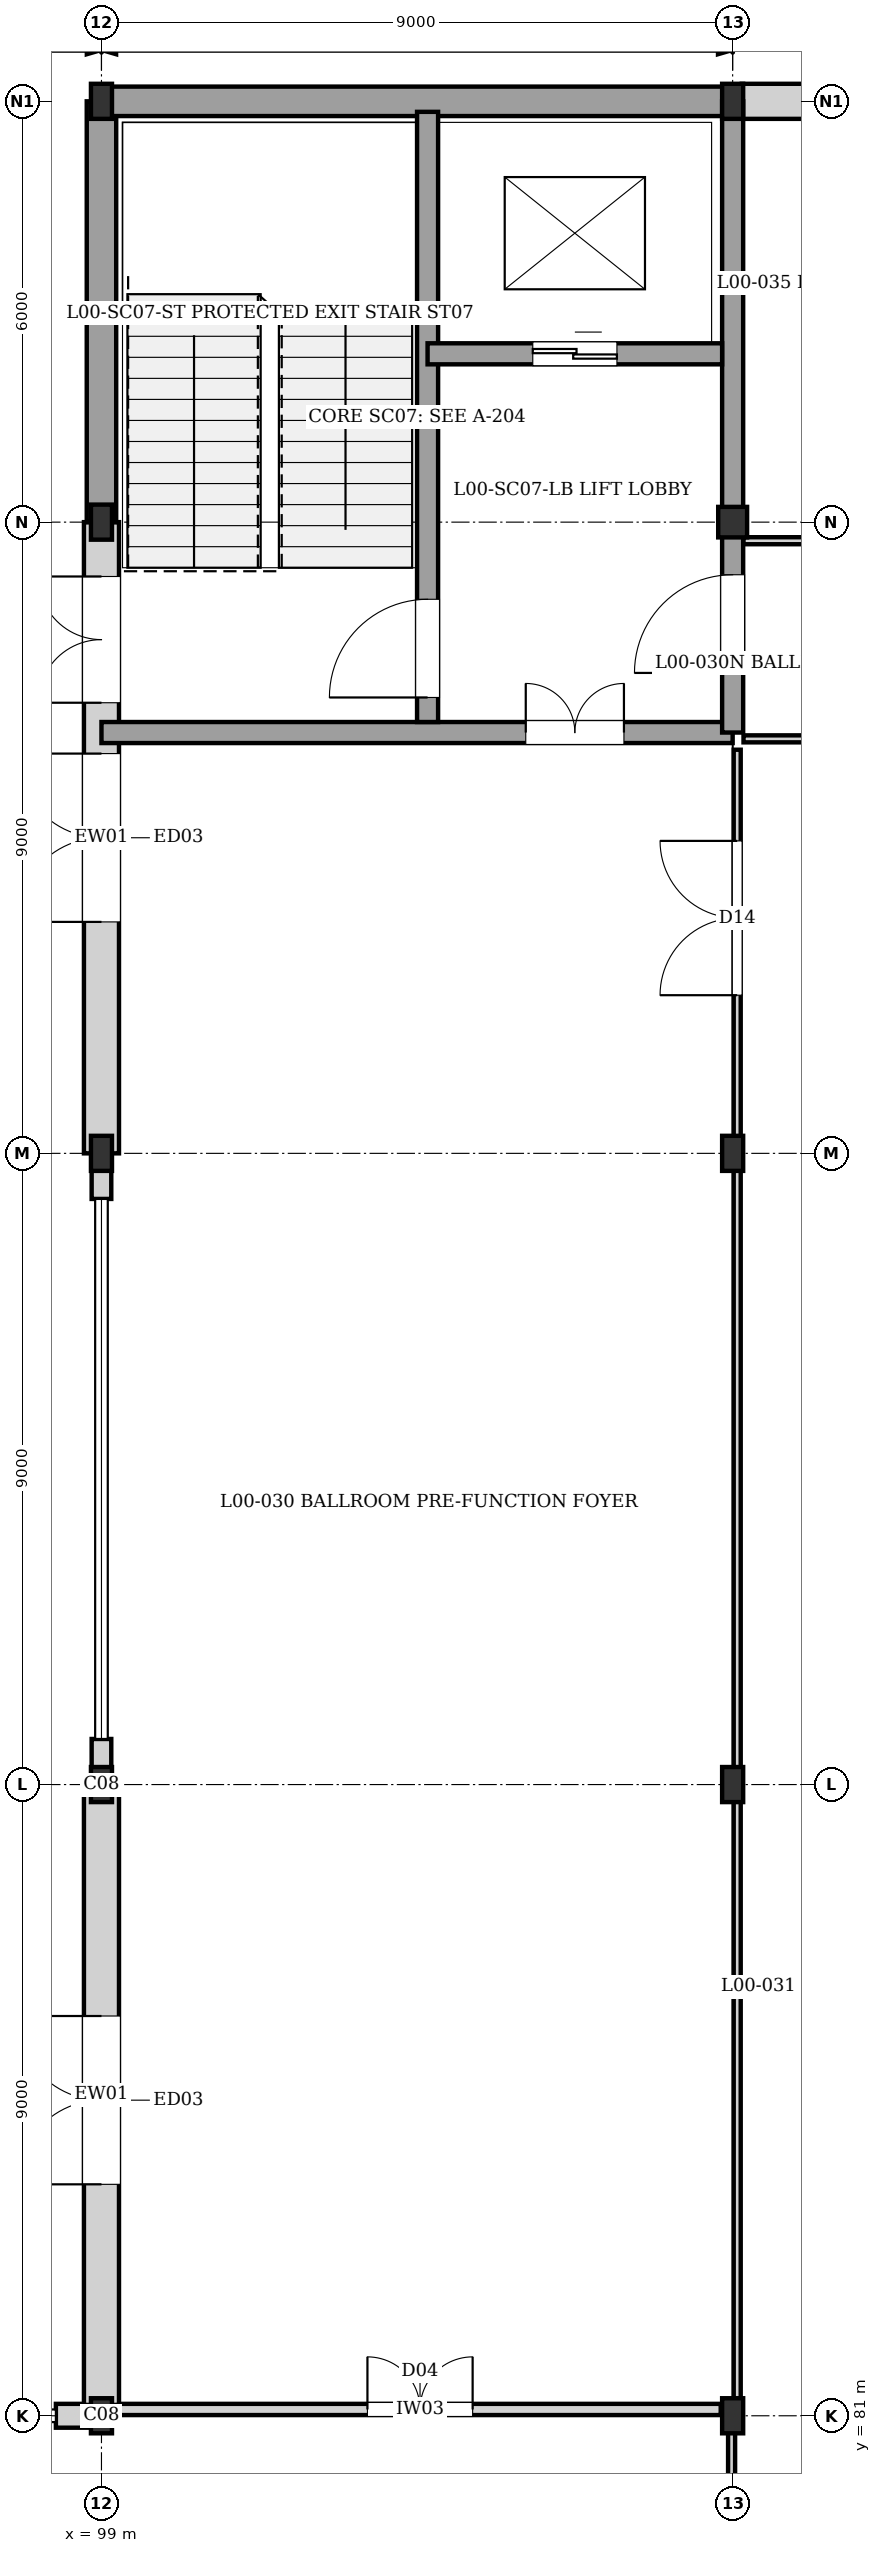
"""IFC4 building model, lengths in metres.
Left out: names, types, materials, properties, quantities, classifications, styles, units other than length and angle.
Written with IfcOpenShell. Run it as: python <this file> out.ifc"""

import sys

from ifc_helpers import new_model, si_unit, direction, frame, frame_2d, origin, origin_2d, place, context, subcontext, project, spatial, rectangle, i_section, extrude, element, fill, save


model = new_model("IFC4")
c1 = context("Model", 3, precision=1e-05, world=origin(), true_north=direction((0.0, 1.0)))
c2 = subcontext(c1, "Body", "Model", "MODEL_VIEW")
j1 = project(units=[si_unit("LENGTHUNIT", "METRE"), si_unit("PLANEANGLEUNIT", "RADIAN")], contexts=[c1])
p1 = place(None, origin())
s1 = spatial("IfcSite", under=j1, at=p1, CompositionType="ELEMENT")
p2 = place(p1, origin())
s2 = spatial("IfcBuilding", under=s1, at=p2, CompositionType="ELEMENT")
p3 = place(p2, origin())
s3 = spatial("IfcBuildingStorey", under=s2, at=p3, CompositionType="ELEMENT", Elevation=0.0)
for number, where, z_axis, x_axis in (
    (1, (99.0, 81.0, 0.0), (0.0, 0.0, 1.0), (1.0, 0.0, 0.0)),
    (2, (99.0, 90.0, 0.0), (0.0, 0.0, 1.0), (1.0, 0.0, 0.0)),
    (3, (99.0, 99.0, 0.0), (0.0, 0.0, 1.0), (1.0, 0.0, 0.0)),
    (4, (99.0, 108.0, 0.0), (0.0, 0.0, 1.0), (1.0, 0.0, 0.0)),
    (5, (99.0, 114.0, 0.0), (0.0, 0.0, 1.0), (1.0, 0.0, 0.0)),
    (6, (108.0, 81.0, 0.0), (0.0, 0.0, 1.0), (1.0, 0.0, 0.0)),
    (7, (108.0, 90.0, 0.0), (0.0, 0.0, 1.0), (1.0, 0.0, 0.0)),
    (8, (108.0, 99.0, 0.0), (0.0, 0.0, 1.0), (1.0, 0.0, 0.0)),
):
    element("IfcColumn", number, at=place(p3, frame(where, z_axis=z_axis, x_axis=x_axis)), inside=s3, PredefinedType="COLUMN", context=c2, shape_type="SweptSolid", body=[
        extrude(i_section(OverallWidth=0.3, OverallDepth=0.5, WebThickness=0.014, FlangeThickness=0.028, at=origin_2d()), origin(), (0.0, 0.0, 1.0), 4.32),
    ])
p4 = place(p3, frame((108.0, 108.0, 0.0), z_axis=(0.0, 0.0, 1.0), x_axis=(1.0, 0.0, 0.0)))
e9 = element("IfcColumn", 9, at=p4, inside=s3, PredefinedType="COLUMN", context=c2, shape_type="SweptSolid", body=[
    extrude(i_section(OverallWidth=0.412, OverallDepth=0.435, WebThickness=0.027, FlangeThickness=0.046, at=origin_2d()), origin(), (0.0, 0.0, 1.0), 4.32),
])
p5 = place(p3, frame((108.0, 114.0, 0.0), z_axis=(0.0, 0.0, 1.0), x_axis=(1.0, 0.0, 0.0)))
e10 = element("IfcColumn", 10, at=p5, inside=s3, PredefinedType="COLUMN", context=c2, shape_type="SweptSolid", body=[
    extrude(i_section(OverallWidth=0.3, OverallDepth=0.5, WebThickness=0.014, FlangeThickness=0.028, at=origin_2d()), origin(), (0.0, 0.0, 1.0), 4.32),
])
p6 = place(p3, frame((98.35, 81.0, 0.0), z_axis=(0.0, 0.0, 1.0), x_axis=(1.0, 0.0, 0.0)))
e11 = element("IfcWall", 11, at=p6, inside=s3, PredefinedType="SOLIDWALL", context=c2, shape_type="SweptSolid", body=[
    extrude(rectangle(XDim=0.65, YDim=0.34, at=frame_2d((0.325, 0.0))), origin(), (0.0, 0.0, 1.0), 3.825),
])
p7 = place(p3, frame((99.0, 81.155, 0.0), z_axis=(0.0, 0.0, 1.0), x_axis=(0.0, 1.0, 0.0)))
e12 = element("IfcWall", 12, at=p7, inside=s3, PredefinedType="SOLIDWALL", context=c2, shape_type="SweptSolid", body=[
    extrude(rectangle(XDim=8.845, YDim=0.5, at=frame_2d((4.422, 0.0))), origin(), (0.0, 0.0, 1.0), 4.055),
])
p8 = place(p7, frame((3.145, 0.0, 0.0)))
e13 = element("IfcOpeningElement", 13, at=p8, cuts=e12, PredefinedType="OPENING", context=c2, shape_type="SweptSolid", body=[
    extrude(rectangle(XDim=2.4, YDim=2.5, at=frame_2d((1.2, 1.25))), frame((0.0, 0.26, 0.0), z_axis=(0.0, -1.0, 0.0), x_axis=(1.0, 0.0, 0.0)), (0.0, 0.0, 1.0), 0.52),
])
for number, where, z_axis, x_axis in (
    (14, (99.0, 90.0, 0.0), (0.0, 0.0, 1.0), (0.0, 1.0, 0.0)),
    (15, (99.0, 98.35, 0.0), (0.0, 0.0, 1.0), (0.0, 1.0, 0.0)),
):
    element("IfcWall", number, at=place(p3, frame(where, z_axis=z_axis, x_axis=x_axis)), inside=s3, PredefinedType="SOLIDWALL", context=c2, shape_type="SweptSolid", body=[
        extrude(rectangle(XDim=0.65, YDim=0.28, at=frame_2d((0.325, 0.0))), origin(), (0.0, 0.0, 1.0), 3.755),
    ])
p9 = place(p3, frame((99.0, 99.0, 0.0), z_axis=(0.0, 0.0, 1.0), x_axis=(0.0, 1.0, 0.0)))
e16 = element("IfcWall", 16, at=p9, inside=s3, PredefinedType="SOLIDWALL", context=c2, shape_type="SweptSolid", body=[
    extrude(rectangle(XDim=9.0, YDim=0.5, at=frame_2d((4.5, 0.0))), origin(), (0.0, 0.0, 1.0), 3.695),
])
p10 = place(p9, frame((6.425, 0.0, 0.0)))
e17 = element("IfcOpeningElement", 17, at=p10, cuts=e16, PredefinedType="OPENING", context=c2, shape_type="SweptSolid", body=[
    extrude(rectangle(XDim=1.8, YDim=2.2, at=frame_2d((0.9, 1.1))), frame((0.0, 0.26, 0.0), z_axis=(0.0, -1.0, 0.0), x_axis=(1.0, 0.0, 0.0)), (0.0, 0.0, 1.0), 0.52),
])
p11 = place(p9, frame((3.3, 0.0, 0.0)))
e18 = element("IfcOpeningElement", 18, at=p11, cuts=e16, PredefinedType="OPENING", context=c2, shape_type="SweptSolid", body=[
    extrude(rectangle(XDim=2.4, YDim=2.5, at=frame_2d((1.2, 1.25))), frame((0.0, 0.26, 0.0), z_axis=(0.0, -1.0, 0.0), x_axis=(1.0, 0.0, 0.0)), (0.0, 0.0, 1.0), 0.52),
])
p12 = place(p3, frame((99.0, 108.0, 0.0), z_axis=(0.0, 0.0, 1.0), x_axis=(0.0, 1.0, 0.0)))
e19 = element("IfcWall", 19, at=p12, inside=s3, PredefinedType="SOLIDWALL", context=c2, shape_type="SweptSolid", body=[
    extrude(rectangle(XDim=6.0, YDim=0.42, at=frame_2d((3.0, 0.0))), origin(), (0.0, 0.0, 1.0), 4.055),
])
p13 = place(p3, frame((99.0, 114.0, 0.0), z_axis=(0.0, 0.0, 1.0), x_axis=(1.0, 0.0, 0.0)))
e20 = element("IfcWall", 20, at=p13, inside=s3, PredefinedType="SOLIDWALL", context=c2, shape_type="SweptSolid", body=[
    extrude(rectangle(XDim=9.0, YDim=0.42, at=frame_2d((4.5, 0.0))), origin(), (0.0, 0.0, 1.0), 4.055),
])
p14 = place(p3, frame((108.13, 114.0, 0.0), z_axis=(0.0, 0.0, 1.0), x_axis=(1.0, 0.0, 0.0)))
e21 = element("IfcWall", 21, at=p14, inside=s3, PredefinedType="SOLIDWALL", context=c2, shape_type="SweptSolid", body=[
    extrude(rectangle(XDim=8.87, YDim=0.5, at=frame_2d((4.435, 0.0))), origin(), (0.0, 0.0, 1.0), 3.695),
])
p15 = place(p3, frame((99.0, 105.0, 0.0), z_axis=(0.0, 0.0, 1.0), x_axis=(1.0, 0.0, 0.0)))
e22 = element("IfcWall", 22, at=p15, inside=s3, PredefinedType="SHEAR", context=c2, shape_type="SweptSolid", body=[
    extrude(rectangle(XDim=9.0, YDim=0.3, at=frame_2d((4.5, 0.0))), origin(), (0.0, 0.0, 1.0), 4.055),
])
p16 = place(p15, frame((6.05, 0.0, 0.0)))
e23 = element("IfcOpeningElement", 23, at=p16, cuts=e22, PredefinedType="OPENING", context=c2, shape_type="SweptSolid", body=[
    extrude(rectangle(XDim=1.4, YDim=2.02, at=frame_2d((0.7, 1.01))), frame((0.0, 0.16, 0.0), z_axis=(0.0, -1.0, 0.0), x_axis=(1.0, 0.0, 0.0)), (0.0, 0.0, 1.0), 0.32),
])
p17 = place(p3, frame((108.0, 105.0, 0.0), z_axis=(0.0, 0.0, 1.0), x_axis=(0.0, 1.0, 0.0)))
e24 = element("IfcWall", 24, at=p17, inside=s3, PredefinedType="SHEAR", context=c2, shape_type="SweptSolid", body=[
    extrude(rectangle(XDim=9.0, YDim=0.3, at=frame_2d((4.5, 0.0))), origin(), (0.0, 0.0, 1.0), 4.055),
])
p18 = place(p17, frame((0.85, 0.0, 0.0)))
e25 = element("IfcOpeningElement", 25, at=p18, cuts=e24, PredefinedType="OPENING", context=c2, shape_type="SweptSolid", body=[
    extrude(rectangle(XDim=1.4, YDim=2.02, at=frame_2d((0.7, 1.01))), frame((0.0, 0.16, 0.0), z_axis=(0.0, -1.0, 0.0), x_axis=(1.0, 0.0, 0.0)), (0.0, 0.0, 1.0), 0.32),
])
p19 = place(p3, frame((103.65, 105.15, 0.0), z_axis=(0.0, 0.0, 1.0), x_axis=(0.0, 1.0, 0.0)))
e26 = element("IfcWall", 26, at=p19, inside=s3, PredefinedType="SHEAR", context=c2, shape_type="SweptSolid", body=[
    extrude(rectangle(XDim=8.7, YDim=0.3, at=frame_2d((4.35, 0.0))), origin(), (0.0, 0.0, 1.0), 4.055),
])
p20 = place(p19, frame((0.35, 0.0, 0.0)))
e27 = element("IfcOpeningElement", 27, at=p20, cuts=e26, PredefinedType="OPENING", context=c2, shape_type="SweptSolid", body=[
    extrude(rectangle(XDim=1.4, YDim=2.02, at=frame_2d((0.7, 1.01))), frame((0.0, 0.16, 0.0), z_axis=(0.0, -1.0, 0.0), x_axis=(1.0, 0.0, 0.0)), (0.0, 0.0, 1.0), 0.32),
])
p21 = place(p3, frame((103.65, 110.4, 0.0), z_axis=(0.0, 0.0, 1.0), x_axis=(1.0, 0.0, 0.0)))
e28 = element("IfcWall", 28, at=p21, inside=s3, PredefinedType="SHEAR", context=c2, shape_type="SweptSolid", body=[
    extrude(rectangle(XDim=4.2, YDim=0.3, at=frame_2d((2.1, 0.0))), origin(), (0.0, 0.0, 1.0), 4.055),
])
p22 = place(p21, frame((1.5, 0.0, 0.0)))
e29 = element("IfcOpeningElement", 29, at=p22, cuts=e28, PredefinedType="OPENING", context=c2, shape_type="SweptSolid", body=[
    extrude(rectangle(XDim=1.2, YDim=2.2, at=frame_2d((0.6, 1.1))), frame((0.0, 0.16, 0.0), z_axis=(0.0, -1.0, 0.0), x_axis=(1.0, 0.0, 0.0)), (0.0, 0.0, 1.0), 0.32),
])
p23 = place(p3, frame((107.985, 72.145, 0.0), z_axis=(0.0, 0.0, 1.0), x_axis=(0.0, 1.0, 0.0)))
e30 = element("IfcWall", 30, at=p23, inside=s3, PredefinedType="PARTITIONING", context=c2, shape_type="SweptSolid", body=[
    extrude(rectangle(XDim=8.935, YDim=0.1, at=frame_2d((4.468, 0.0))), origin(), (0.0, 0.0, 1.0), 3.655),
])
p24 = place(p3, frame((108.155, 104.91, 0.0), z_axis=(0.0, 0.0, 1.0), x_axis=(1.0, 0.0, 0.0)))
e31 = element("IfcWall", 31, at=p24, inside=s3, PredefinedType="PARTITIONING", context=c2, shape_type="SweptSolid", body=[
    extrude(rectangle(XDim=14.745, YDim=0.1, at=frame_2d((7.373, 0.0))), origin(), (0.0, 0.0, 1.0), 4.055),
])
p25 = place(p3, frame((99.255, 81.09, 0.0), z_axis=(0.0, 0.0, 1.0), x_axis=(1.0, 0.0, 0.0)))
e32 = element("IfcWall", 32, at=p25, inside=s3, PredefinedType="PARTITIONING", context=c2, shape_type="SweptSolid", body=[
    extrude(rectangle(XDim=8.575, YDim=0.16, at=frame_2d((4.288, 0.0))), origin(), (0.0, 0.0, 1.0), 3.755),
])
p26 = place(p25, frame((3.538, 0.0, 0.0)))
e33 = element("IfcOpeningElement", 33, at=p26, cuts=e32, PredefinedType="OPENING", context=c2, shape_type="SweptSolid", body=[
    extrude(rectangle(XDim=1.5, YDim=2.1, at=frame_2d((0.75, 1.05))), frame((0.0, 0.09, 0.0), z_axis=(0.0, -1.0, 0.0), x_axis=(1.0, 0.0, 0.0)), (0.0, 0.0, 1.0), 0.18),
])
p27 = place(p3, frame((108.065, 81.245, 0.0), z_axis=(0.0, 0.0, 1.0), x_axis=(0.0, 1.0, 0.0)))
e34 = element("IfcWall", 34, at=p27, inside=s3, PredefinedType="PARTITIONING", context=c2, shape_type="SweptSolid", body=[
    extrude(rectangle(XDim=8.775, YDim=0.1, at=frame_2d((4.387, 0.0))), origin(), (0.0, 0.0, 1.0), 4.055),
])
p28 = place(p3, frame((108.155, 107.735, 0.0), z_axis=(0.0, 0.0, 1.0), x_axis=(1.0, 0.0, 0.0)))
e35 = element("IfcWall", 35, at=p28, inside=s3, PredefinedType="PARTITIONING", context=c2, shape_type="SweptSolid", body=[
    extrude(rectangle(XDim=11.6, YDim=0.1, at=frame_2d((5.8, 0.0))), origin(), (0.0, 0.0, 1.0), 4.055),
])
p29 = place(p28, frame((3.308, 0.0, 0.0)))
e36 = element("IfcOpeningElement", 36, at=p29, cuts=e35, PredefinedType="OPENING", context=c2, shape_type="SweptSolid", body=[
    extrude(rectangle(XDim=2.2, YDim=2.45, at=frame_2d((1.1, 1.225))), frame((0.0, 0.06, 0.0), z_axis=(0.0, -1.0, 0.0), x_axis=(1.0, 0.0, 0.0)), (0.0, 0.0, 1.0), 0.12),
])
p30 = place(p3, frame((108.065, 90.02, 0.0), z_axis=(0.0, 0.0, 1.0), x_axis=(0.0, 1.0, 0.0)))
e37 = element("IfcWall", 37, at=p30, inside=s3, PredefinedType="PARTITIONING", context=c2, shape_type="SweptSolid", body=[
    extrude(rectangle(XDim=8.96, YDim=0.1, at=frame_2d((4.48, 0.0))), origin(), (0.0, 0.0, 1.0), 3.755),
])
p31 = place(p3, frame((108.065, 98.98, 0.0), z_axis=(0.0, 0.0, 1.0), x_axis=(0.0, 1.0, 0.0)))
e38 = element("IfcWall", 38, at=p31, inside=s3, PredefinedType="PARTITIONING", context=c2, shape_type="SweptSolid", body=[
    extrude(rectangle(XDim=5.775, YDim=0.1, at=frame_2d((2.887, 0.0))), origin(), (0.0, 0.0, 1.0), 3.695),
])
p32 = place(p31, frame((2.275, 0.0, 0.0)))
e39 = element("IfcOpeningElement", 39, at=p32, cuts=e38, PredefinedType="OPENING", context=c2, shape_type="SweptSolid", body=[
    extrude(rectangle(XDim=2.2, YDim=2.45, at=frame_2d((1.1, 1.225))), frame((0.0, 0.06, 0.0), z_axis=(0.0, -1.0, 0.0), x_axis=(1.0, 0.0, 0.0)), (0.0, 0.0, 1.0), 0.12),
])
p33 = place(p8, origin())
e40 = element("IfcDoor", 40, at=p33, inside=s3, OperationType="DOUBLE_DOOR_SINGLE_SWING", PredefinedType="DOOR", context=c2, shape_type="SweptSolid", body=[
    extrude(rectangle(XDim=2.4, YDim=2.5, at=frame_2d((1.2, 1.25))), frame((0.0, 0.025, 0.0), z_axis=(0.0, -1.0, 0.0), x_axis=(1.0, 0.0, 0.0)), (0.0, 0.0, 1.0), 0.05),
])
fill(e13, e40)
p34 = place(p10, origin())
e41 = element("IfcDoor", 41, at=p34, inside=s3, OperationType="DOUBLE_DOOR_SINGLE_SWING", PredefinedType="DOOR", context=c2, shape_type="SweptSolid", body=[
    extrude(rectangle(XDim=1.8, YDim=2.2, at=frame_2d((0.9, 1.1))), frame((0.0, 0.025, 0.0), z_axis=(0.0, -1.0, 0.0), x_axis=(1.0, 0.0, 0.0)), (0.0, 0.0, 1.0), 0.05),
])
fill(e17, e41)
p35 = place(p11, origin())
e42 = element("IfcDoor", 42, at=p35, inside=s3, OperationType="DOUBLE_DOOR_SINGLE_SWING", PredefinedType="DOOR", context=c2, shape_type="SweptSolid", body=[
    extrude(rectangle(XDim=2.4, YDim=2.5, at=frame_2d((1.2, 1.25))), frame((0.0, 0.025, 0.0), z_axis=(0.0, -1.0, 0.0), x_axis=(1.0, 0.0, 0.0)), (0.0, 0.0, 1.0), 0.05),
])
fill(e18, e42)
p36 = place(p16, origin())
e43 = element("IfcDoor", 43, at=p36, inside=s3, OperationType="DOUBLE_DOOR_SINGLE_SWING", PredefinedType="DOOR", context=c2, shape_type="SweptSolid", body=[
    extrude(rectangle(XDim=1.4, YDim=2.02, at=frame_2d((0.7, 1.01))), frame((0.0, 0.025, 0.0), z_axis=(0.0, -1.0, 0.0), x_axis=(1.0, 0.0, 0.0)), (0.0, 0.0, 1.0), 0.05),
])
fill(e23, e43)
p37 = place(p18, origin())
e44 = element("IfcDoor", 44, at=p37, inside=s3, OperationType="SINGLE_SWING_LEFT", PredefinedType="DOOR", context=c2, shape_type="SweptSolid", body=[
    extrude(rectangle(XDim=1.4, YDim=2.02, at=frame_2d((0.7, 1.01))), frame((0.0, 0.025, 0.0), z_axis=(0.0, -1.0, 0.0), x_axis=(1.0, 0.0, 0.0)), (0.0, 0.0, 1.0), 0.05),
])
fill(e25, e44)
p38 = place(p20, origin())
e45 = element("IfcDoor", 45, at=p38, inside=s3, OperationType="SINGLE_SWING_LEFT", PredefinedType="DOOR", context=c2, shape_type="SweptSolid", body=[
    extrude(rectangle(XDim=1.4, YDim=2.02, at=frame_2d((0.7, 1.01))), frame((0.0, 0.025, 0.0), z_axis=(0.0, -1.0, 0.0), x_axis=(1.0, 0.0, 0.0)), (0.0, 0.0, 1.0), 0.05),
])
fill(e27, e45)
p39 = place(p22, origin())
e46 = element("IfcDoor", 46, at=p39, inside=s3, OperationType="DOUBLE_DOOR_SLIDING", PredefinedType="DOOR", context=c2, shape_type="SweptSolid", body=[
    extrude(rectangle(XDim=1.2, YDim=2.2, at=frame_2d((0.6, 1.1))), frame((0.0, 0.025, 0.0), z_axis=(0.0, -1.0, 0.0), x_axis=(1.0, 0.0, 0.0)), (0.0, 0.0, 1.0), 0.05),
])
fill(e29, e46)
p40 = place(p26, origin())
e47 = element("IfcDoor", 47, at=p40, inside=s3, OperationType="DOUBLE_DOOR_SINGLE_SWING", PredefinedType="DOOR", context=c2, shape_type="SweptSolid", body=[
    extrude(rectangle(XDim=1.5, YDim=2.1, at=frame_2d((0.75, 1.05))), frame((0.0, 0.025, 0.0), z_axis=(0.0, -1.0, 0.0), x_axis=(1.0, 0.0, 0.0)), (0.0, 0.0, 1.0), 0.05),
])
fill(e33, e47)
p41 = place(p32, origin())
e48 = element("IfcDoor", 48, at=p41, inside=s3, OperationType="DOUBLE_DOOR_SINGLE_SWING", PredefinedType="DOOR", context=c2, shape_type="SweptSolid", body=[
    extrude(rectangle(XDim=2.2, YDim=2.45, at=frame_2d((1.1, 1.225))), frame((0.0, 0.025, 0.0), z_axis=(0.0, -1.0, 0.0), x_axis=(1.0, 0.0, 0.0)), (0.0, 0.0, 1.0), 0.05),
])
fill(e39, e48)
save(model, sys.argv[1])
